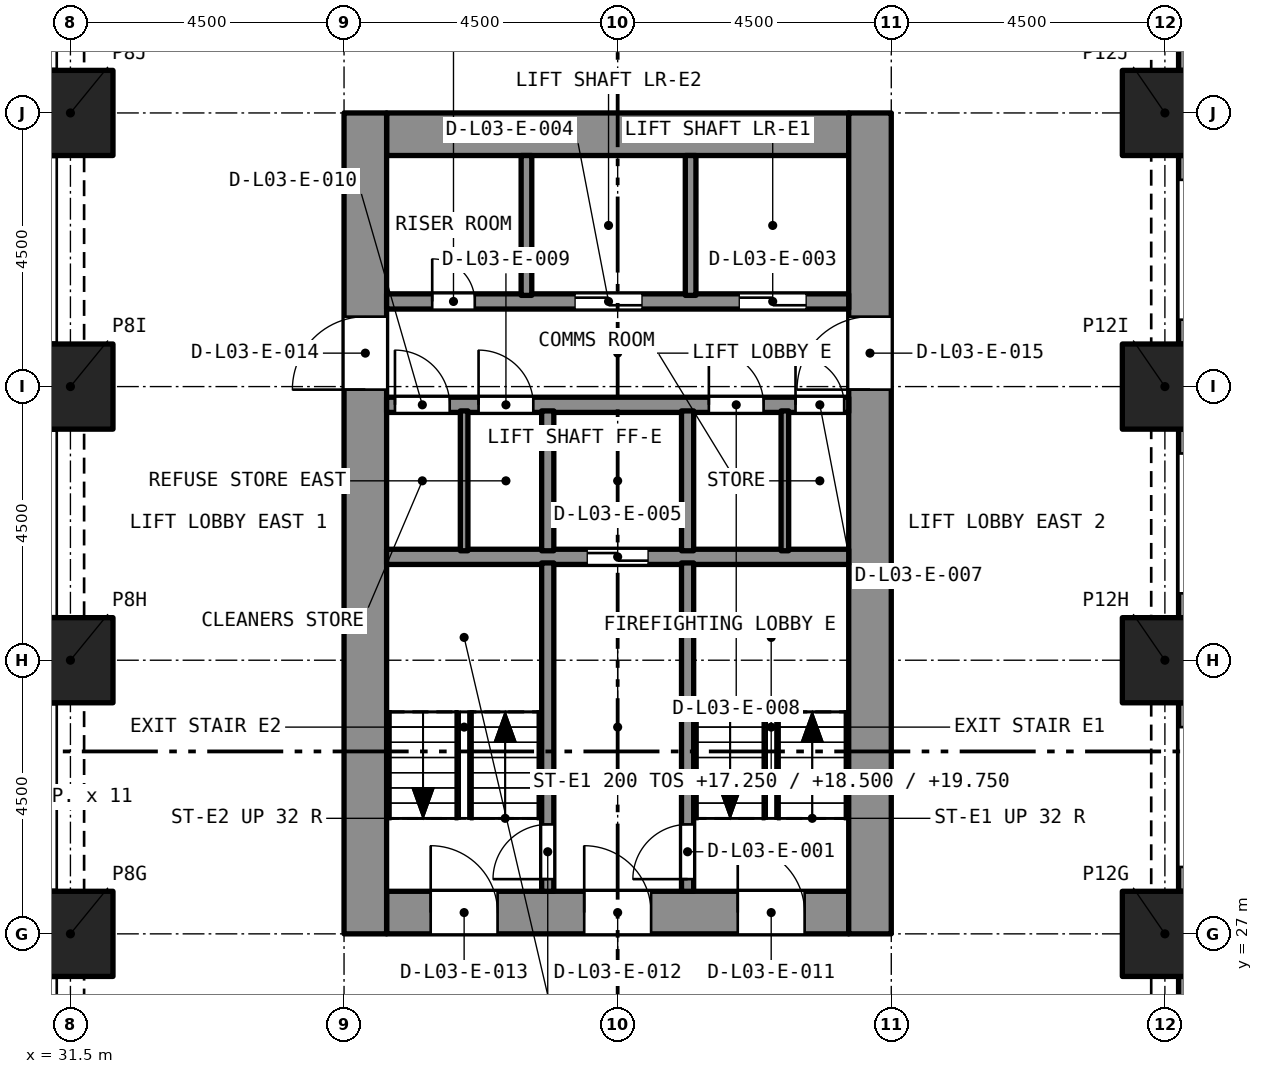
"""IFC4 building model, lengths in metres.
Left out: names, types, materials, properties, quantities, classifications, styles, units other than length and angle.
Written with IfcOpenShell. Run it as: python <this file> out.ifc"""

import sys

from ifc_helpers import new_model, si_unit, direction, frame, frame_2d, origin, origin_2d, place, context, subcontext, project, spatial, rectangle, extrude, element, fill, save


model = new_model("IFC4")
c1 = context("Model", 3, precision=1e-05, world=origin(), true_north=direction((0.0, 1.0)))
c2 = subcontext(c1, "Body", "Model", "MODEL_VIEW")
j1 = project(units=[si_unit("LENGTHUNIT", "METRE"), si_unit("PLANEANGLEUNIT", "RADIAN")], contexts=[c1])
p1 = place(None, origin())
s1 = spatial("IfcSite", under=j1, at=p1, CompositionType="ELEMENT")
p2 = place(p1, origin())
s2 = spatial("IfcBuilding", under=s1, at=p2, CompositionType="ELEMENT")
p3 = place(p2, frame((0.0, 0.0, 16.0)))
s3 = spatial("IfcBuildingStorey", under=s2, at=p3, CompositionType="ELEMENT", Elevation=16.0)
for number, where, z_axis, x_axis in (
    (1, (31.5, 27.0, 0.0), (0.0, 0.0, 1.0), (1.0, 0.0, 0.0)),
    (2, (49.5, 27.0, 0.0), (0.0, 0.0, 1.0), (1.0, 0.0, 0.0)),
    (3, (31.5, 31.5, 0.0), (0.0, 0.0, 1.0), (1.0, 0.0, 0.0)),
    (4, (49.5, 31.5, 0.0), (0.0, 0.0, 1.0), (1.0, 0.0, 0.0)),
    (5, (31.5, 36.0, 0.0), (0.0, 0.0, 1.0), (1.0, 0.0, 0.0)),
    (6, (49.5, 36.0, 0.0), (0.0, 0.0, 1.0), (1.0, 0.0, 0.0)),
    (7, (31.5, 40.5, 0.0), (0.0, 0.0, 1.0), (1.0, 0.0, 0.0)),
    (8, (49.5, 40.5, 0.0), (0.0, 0.0, 1.0), (1.0, 0.0, 0.0)),
):
    element("IfcColumn", number, at=place(p3, frame(where, z_axis=z_axis, x_axis=x_axis)), inside=s3, PredefinedType="COLUMN", context=c2, shape_type="SweptSolid", body=[
        extrude(rectangle(XDim=1.4, YDim=1.4, at=origin_2d()), origin(), (0.0, 0.0, 1.0), 5.0),
    ])
p4 = place(p3, frame((36.7, 27.35, 0.0), z_axis=(0.0, 0.0, 1.0), x_axis=(1.0, 0.0, 0.0)))
e9 = element("IfcWall", 9, at=p4, inside=s3, PredefinedType="SOLIDWALL", context=c2, shape_type="SweptSolid", body=[
    extrude(rectangle(XDim=7.6, YDim=0.7, at=frame_2d((3.8, 0.0))), origin(), (0.0, 0.0, 1.0), 5.0),
])
p5 = place(p4, frame((5.775, 0.0, 0.0)))
e10 = element("IfcOpeningElement", 10, at=p5, cuts=e9, PredefinedType="OPENING", context=c2, shape_type="SweptSolid", body=[
    extrude(rectangle(XDim=1.1, YDim=2.1, at=frame_2d((0.55, 1.05))), frame((0.0, 0.36, 0.0), z_axis=(0.0, -1.0, 0.0), x_axis=(1.0, 0.0, 0.0)), (0.0, 0.0, 1.0), 0.72),
])
p6 = place(p4, frame((3.25, 0.0, 0.0)))
e11 = element("IfcOpeningElement", 11, at=p6, cuts=e9, PredefinedType="OPENING", context=c2, shape_type="SweptSolid", body=[
    extrude(rectangle(XDim=1.1, YDim=2.1, at=frame_2d((0.55, 1.05))), frame((0.0, 0.36, 0.0), z_axis=(0.0, -1.0, 0.0), x_axis=(1.0, 0.0, 0.0)), (0.0, 0.0, 1.0), 0.72),
])
p7 = place(p4, frame((0.725, 0.0, 0.0)))
e12 = element("IfcOpeningElement", 12, at=p7, cuts=e9, PredefinedType="OPENING", context=c2, shape_type="SweptSolid", body=[
    extrude(rectangle(XDim=1.1, YDim=2.1, at=frame_2d((0.55, 1.05))), frame((0.0, 0.36, 0.0), z_axis=(0.0, -1.0, 0.0), x_axis=(1.0, 0.0, 0.0)), (0.0, 0.0, 1.0), 0.72),
])
p8 = place(p3, frame((36.7, 40.15, 0.0), z_axis=(0.0, 0.0, 1.0), x_axis=(1.0, 0.0, 0.0)))
e13 = element("IfcWall", 13, at=p8, inside=s3, PredefinedType="SOLIDWALL", context=c2, shape_type="SweptSolid", body=[
    extrude(rectangle(XDim=7.6, YDim=0.7, at=frame_2d((3.8, 0.0))), origin(), (0.0, 0.0, 1.0), 5.0),
])
p9 = place(p3, frame((36.35, 27.0, 0.0), z_axis=(0.0, 0.0, 1.0), x_axis=(0.0, 1.0, 0.0)))
e14 = element("IfcWall", 14, at=p9, inside=s3, PredefinedType="SOLIDWALL", context=c2, shape_type="SweptSolid", body=[
    extrude(rectangle(XDim=13.5, YDim=0.7, at=frame_2d((6.75, 0.0))), origin(), (0.0, 0.0, 1.0), 5.0),
])
p10 = place(p9, frame((8.95, 0.0, 0.0)))
e15 = element("IfcOpeningElement", 15, at=p10, cuts=e14, PredefinedType="OPENING", context=c2, shape_type="SweptSolid", body=[
    extrude(rectangle(XDim=1.2, YDim=2.1, at=frame_2d((0.6, 1.05))), frame((0.0, 0.36, 0.0), z_axis=(0.0, -1.0, 0.0), x_axis=(1.0, 0.0, 0.0)), (0.0, 0.0, 1.0), 0.72),
])
p11 = place(p3, frame((44.65, 27.0, 0.0), z_axis=(0.0, 0.0, 1.0), x_axis=(0.0, 1.0, 0.0)))
e16 = element("IfcWall", 16, at=p11, inside=s3, PredefinedType="SOLIDWALL", context=c2, shape_type="SweptSolid", body=[
    extrude(rectangle(XDim=13.5, YDim=0.7, at=frame_2d((6.75, 0.0))), origin(), (0.0, 0.0, 1.0), 5.0),
])
p12 = place(p11, frame((8.95, 0.0, 0.0)))
e17 = element("IfcOpeningElement", 17, at=p12, cuts=e16, PredefinedType="OPENING", context=c2, shape_type="SweptSolid", body=[
    extrude(rectangle(XDim=1.2, YDim=2.1, at=frame_2d((0.6, 1.05))), frame((0.0, 0.36, 0.0), z_axis=(0.0, -1.0, 0.0), x_axis=(1.0, 0.0, 0.0)), (0.0, 0.0, 1.0), 0.72),
])
p13 = place(p3, frame((49.875, 26.3, 0.0), z_axis=(0.0, 0.0, 1.0), x_axis=(0.0, -1.0, 0.0)))
e18 = element("IfcWall", 18, at=p13, inside=s3, PredefinedType="SOLIDWALL", context=c2, shape_type="SweptSolid", body=[
    extrude(rectangle(XDim=3.1, YDim=0.3, at=frame_2d((1.55, 0.0))), origin(), (0.0, 0.0, 1.0), 5.0),
])
p14 = place(p13, frame((0.4, 0.0, 0.45)))
e19 = element("IfcOpeningElement", 19, at=p14, cuts=e18, PredefinedType="OPENING", context=c2, shape_type="SweptSolid", body=[
    extrude(rectangle(XDim=2.3, YDim=3.3, at=frame_2d((1.15, 1.65))), frame((0.0, 0.16, 0.0), z_axis=(0.0, -1.0, 0.0), x_axis=(1.0, 0.0, 0.0)), (0.0, 0.0, 1.0), 0.32),
])
p15 = place(p3, frame((49.875, 30.8, 0.0), z_axis=(0.0, 0.0, 1.0), x_axis=(0.0, -1.0, 0.0)))
e20 = element("IfcWall", 20, at=p15, inside=s3, PredefinedType="SOLIDWALL", context=c2, shape_type="SweptSolid", body=[
    extrude(rectangle(XDim=3.1, YDim=0.3, at=frame_2d((1.55, 0.0))), origin(), (0.0, 0.0, 1.0), 5.0),
])
p16 = place(p15, frame((0.4, 0.0, 0.45)))
e21 = element("IfcOpeningElement", 21, at=p16, cuts=e20, PredefinedType="OPENING", context=c2, shape_type="SweptSolid", body=[
    extrude(rectangle(XDim=2.3, YDim=3.3, at=frame_2d((1.15, 1.65))), frame((0.0, 0.16, 0.0), z_axis=(0.0, -1.0, 0.0), x_axis=(1.0, 0.0, 0.0)), (0.0, 0.0, 1.0), 0.32),
])
p17 = place(p3, frame((49.875, 35.3, 0.0), z_axis=(0.0, 0.0, 1.0), x_axis=(0.0, -1.0, 0.0)))
e22 = element("IfcWall", 22, at=p17, inside=s3, PredefinedType="SOLIDWALL", context=c2, shape_type="SweptSolid", body=[
    extrude(rectangle(XDim=3.1, YDim=0.3, at=frame_2d((1.55, 0.0))), origin(), (0.0, 0.0, 1.0), 5.0),
])
p18 = place(p17, frame((0.4, 0.0, 0.45)))
e23 = element("IfcOpeningElement", 23, at=p18, cuts=e22, PredefinedType="OPENING", context=c2, shape_type="SweptSolid", body=[
    extrude(rectangle(XDim=2.3, YDim=3.3, at=frame_2d((1.15, 1.65))), frame((0.0, 0.16, 0.0), z_axis=(0.0, -1.0, 0.0), x_axis=(1.0, 0.0, 0.0)), (0.0, 0.0, 1.0), 0.32),
])
p19 = place(p3, frame((49.875, 39.8, 0.0), z_axis=(0.0, 0.0, 1.0), x_axis=(0.0, -1.0, 0.0)))
e24 = element("IfcWall", 24, at=p19, inside=s3, PredefinedType="SOLIDWALL", context=c2, shape_type="SweptSolid", body=[
    extrude(rectangle(XDim=3.1, YDim=0.3, at=frame_2d((1.55, 0.0))), origin(), (0.0, 0.0, 1.0), 5.0),
])
p20 = place(p19, frame((0.4, 0.0, 0.45)))
e25 = element("IfcOpeningElement", 25, at=p20, cuts=e24, PredefinedType="OPENING", context=c2, shape_type="SweptSolid", body=[
    extrude(rectangle(XDim=2.3, YDim=3.3, at=frame_2d((1.15, 1.65))), frame((0.0, 0.16, 0.0), z_axis=(0.0, -1.0, 0.0), x_axis=(1.0, 0.0, 0.0)), (0.0, 0.0, 1.0), 0.32),
])
p21 = place(p3, frame((49.875, 44.3, 0.0), z_axis=(0.0, 0.0, 1.0), x_axis=(0.0, -1.0, 0.0)))
e26 = element("IfcWall", 26, at=p21, inside=s3, PredefinedType="SOLIDWALL", context=c2, shape_type="SweptSolid", body=[
    extrude(rectangle(XDim=3.1, YDim=0.3, at=frame_2d((1.55, 0.0))), origin(), (0.0, 0.0, 1.0), 5.0),
])
p22 = place(p21, frame((0.4, 0.0, 0.45)))
e27 = element("IfcOpeningElement", 27, at=p22, cuts=e26, PredefinedType="OPENING", context=c2, shape_type="SweptSolid", body=[
    extrude(rectangle(XDim=2.3, YDim=3.3, at=frame_2d((1.15, 1.65))), frame((0.0, 0.16, 0.0), z_axis=(0.0, -1.0, 0.0), x_axis=(1.0, 0.0, 0.0)), (0.0, 0.0, 1.0), 0.32),
])
p23 = place(p3, frame((36.7, 33.2, 0.0), z_axis=(0.0, 0.0, 1.0), x_axis=(1.0, 0.0, 0.0)))
e28 = element("IfcWall", 28, at=p23, inside=s3, PredefinedType="SOLIDWALL", context=c2, shape_type="SweptSolid", body=[
    extrude(rectangle(XDim=7.6, YDim=0.25, at=frame_2d((3.8, 0.0))), origin(), (0.0, 0.0, 1.0), 4.65),
])
p24 = place(p23, frame((3.3, 0.0, 0.0)))
e29 = element("IfcOpeningElement", 29, at=p24, cuts=e28, PredefinedType="OPENING", context=c2, shape_type="SweptSolid", body=[
    extrude(rectangle(XDim=1.0, YDim=2.1, at=frame_2d((0.5, 1.05))), frame((0.0, 0.135, 0.0), z_axis=(0.0, -1.0, 0.0), x_axis=(1.0, 0.0, 0.0)), (0.0, 0.0, 1.0), 0.27),
])
p25 = place(p3, frame((36.7, 35.7, 0.0), z_axis=(0.0, 0.0, 1.0), x_axis=(1.0, 0.0, 0.0)))
e30 = element("IfcWall", 30, at=p25, inside=s3, PredefinedType="SOLIDWALL", context=c2, shape_type="SweptSolid", body=[
    extrude(rectangle(XDim=7.6, YDim=0.25, at=frame_2d((3.8, 0.0))), origin(), (0.0, 0.0, 1.0), 4.65),
])
p26 = place(p25, frame((6.725, 0.0, 0.0)))
e31 = element("IfcOpeningElement", 31, at=p26, cuts=e30, PredefinedType="OPENING", context=c2, shape_type="SweptSolid", body=[
    extrude(rectangle(XDim=0.8, YDim=2.1, at=frame_2d((0.4, 1.05))), frame((0.0, 0.135, 0.0), z_axis=(0.0, -1.0, 0.0), x_axis=(1.0, 0.0, 0.0)), (0.0, 0.0, 1.0), 0.27),
])
p27 = place(p25, frame((5.3, 0.0, 0.0)))
e32 = element("IfcOpeningElement", 32, at=p27, cuts=e30, PredefinedType="OPENING", context=c2, shape_type="SweptSolid", body=[
    extrude(rectangle(XDim=0.9, YDim=2.1, at=frame_2d((0.45, 1.05))), frame((0.0, 0.135, 0.0), z_axis=(0.0, -1.0, 0.0), x_axis=(1.0, 0.0, 0.0)), (0.0, 0.0, 1.0), 0.27),
])
p28 = place(p25, frame((1.512, 0.0, 0.0)))
e33 = element("IfcOpeningElement", 33, at=p28, cuts=e30, PredefinedType="OPENING", context=c2, shape_type="SweptSolid", body=[
    extrude(rectangle(XDim=0.9, YDim=2.1, at=frame_2d((0.45, 1.05))), frame((0.0, 0.135, 0.0), z_axis=(0.0, -1.0, 0.0), x_axis=(1.0, 0.0, 0.0)), (0.0, 0.0, 1.0), 0.27),
])
p29 = place(p25, frame((0.137, 0.0, 0.0)))
e34 = element("IfcOpeningElement", 34, at=p29, cuts=e30, PredefinedType="OPENING", context=c2, shape_type="SweptSolid", body=[
    extrude(rectangle(XDim=0.9, YDim=2.1, at=frame_2d((0.45, 1.05))), frame((0.0, 0.135, 0.0), z_axis=(0.0, -1.0, 0.0), x_axis=(1.0, 0.0, 0.0)), (0.0, 0.0, 1.0), 0.27),
])
p30 = place(p3, frame((36.7, 37.4, 0.0), z_axis=(0.0, 0.0, 1.0), x_axis=(1.0, 0.0, 0.0)))
e35 = element("IfcWall", 35, at=p30, inside=s3, PredefinedType="SOLIDWALL", context=c2, shape_type="SweptSolid", body=[
    extrude(rectangle(XDim=7.6, YDim=0.25, at=frame_2d((3.8, 0.0))), origin(), (0.0, 0.0, 1.0), 4.65),
])
p31 = place(p30, frame((5.8, 0.0, 0.0)))
e36 = element("IfcOpeningElement", 36, at=p31, cuts=e35, PredefinedType="OPENING", context=c2, shape_type="SweptSolid", body=[
    extrude(rectangle(XDim=1.1, YDim=2.4, at=frame_2d((0.55, 1.2))), frame((0.0, 0.135, 0.0), z_axis=(0.0, -1.0, 0.0), x_axis=(1.0, 0.0, 0.0)), (0.0, 0.0, 1.0), 0.27),
])
p32 = place(p30, frame((3.1, 0.0, 0.0)))
e37 = element("IfcOpeningElement", 37, at=p32, cuts=e35, PredefinedType="OPENING", context=c2, shape_type="SweptSolid", body=[
    extrude(rectangle(XDim=1.1, YDim=2.4, at=frame_2d((0.55, 1.2))), frame((0.0, 0.135, 0.0), z_axis=(0.0, -1.0, 0.0), x_axis=(1.0, 0.0, 0.0)), (0.0, 0.0, 1.0), 0.27),
])
p33 = place(p30, frame((0.75, 0.0, 0.0)))
e38 = element("IfcOpeningElement", 38, at=p33, cuts=e35, PredefinedType="OPENING", context=c2, shape_type="SweptSolid", body=[
    extrude(rectangle(XDim=0.7, YDim=2.1, at=frame_2d((0.35, 1.05))), frame((0.0, 0.135, 0.0), z_axis=(0.0, -1.0, 0.0), x_axis=(1.0, 0.0, 0.0)), (0.0, 0.0, 1.0), 0.27),
])
p34 = place(p3, frame((41.65, 27.7, 0.0), z_axis=(0.0, 0.0, 1.0), x_axis=(0.0, 1.0, 0.0)))
e39 = element("IfcWall", 39, at=p34, inside=s3, PredefinedType="SOLIDWALL", context=c2, shape_type="SweptSolid", body=[
    extrude(rectangle(XDim=5.4, YDim=0.2, at=frame_2d((2.7, 0.0))), origin(), (0.0, 0.0, 1.0), 4.65),
])
p35 = place(p34, frame((0.2, 0.0, 0.0)))
e40 = element("IfcOpeningElement", 40, at=p35, cuts=e39, PredefinedType="OPENING", context=c2, shape_type="SweptSolid", body=[
    extrude(rectangle(XDim=0.9, YDim=2.1, at=frame_2d((0.45, 1.05))), frame((0.0, 0.11, 0.0), z_axis=(0.0, -1.0, 0.0), x_axis=(1.0, 0.0, 0.0)), (0.0, 0.0, 1.0), 0.22),
])
p36 = place(p3, frame((39.35, 27.7, 0.0), z_axis=(0.0, 0.0, 1.0), x_axis=(0.0, 1.0, 0.0)))
e41 = element("IfcWall", 41, at=p36, inside=s3, PredefinedType="SOLIDWALL", context=c2, shape_type="SweptSolid", body=[
    extrude(rectangle(XDim=5.4, YDim=0.2, at=frame_2d((2.7, 0.0))), origin(), (0.0, 0.0, 1.0), 4.65),
])
p37 = place(p36, frame((0.2, 0.0, 0.0)))
e42 = element("IfcOpeningElement", 42, at=p37, cuts=e41, PredefinedType="OPENING", context=c2, shape_type="SweptSolid", body=[
    extrude(rectangle(XDim=0.9, YDim=2.1, at=frame_2d((0.45, 1.05))), frame((0.0, 0.11, 0.0), z_axis=(0.0, -1.0, 0.0), x_axis=(1.0, 0.0, 0.0)), (0.0, 0.0, 1.0), 0.22),
])
for number, where, z_axis, x_axis in (
    (43, (41.65, 33.3, 0.0), (0.0, 0.0, 1.0), (0.0, 1.0, 0.0)),
    (44, (39.35, 33.3, 0.0), (0.0, 0.0, 1.0), (0.0, 1.0, 0.0)),
):
    element("IfcWall", number, at=place(p3, frame(where, z_axis=z_axis, x_axis=x_axis)), inside=s3, PredefinedType="SOLIDWALL", context=c2, shape_type="SweptSolid", body=[
        extrude(rectangle(XDim=2.3, YDim=0.2, at=frame_2d((1.15, 0.0))), origin(), (0.0, 0.0, 1.0), 4.65),
    ])
for number, where, z_axis, x_axis in (
    (45, (41.7, 37.5, 0.0), (0.0, 0.0, 1.0), (0.0, 1.0, 0.0)),
    (46, (39.0, 37.5, 0.0), (0.0, 0.0, 1.0), (0.0, 1.0, 0.0)),
):
    element("IfcWall", number, at=place(p3, frame(where, z_axis=z_axis, x_axis=x_axis)), inside=s3, PredefinedType="SOLIDWALL", context=c2, shape_type="SweptSolid", body=[
        extrude(rectangle(XDim=2.3, YDim=0.175, at=frame_2d((1.15, 0.0))), origin(), (0.0, 0.0, 1.0), 4.65),
    ])
for number, where, z_axis, x_axis in (
    (47, (43.25, 33.3, 0.0), (0.0, 0.0, 1.0), (0.0, 1.0, 0.0)),
    (48, (37.975, 33.3, 0.0), (0.0, 0.0, 1.0), (0.0, 1.0, 0.0)),
):
    element("IfcWall", number, at=place(p3, frame(where, z_axis=z_axis, x_axis=x_axis)), inside=s3, PredefinedType="PARTITIONING", context=c2, shape_type="SweptSolid", body=[
        extrude(rectangle(XDim=2.3, YDim=0.125, at=frame_2d((1.15, 0.0))), origin(), (0.0, 0.0, 1.0), 4.65),
    ])
p38 = place(p35, origin())
e49 = element("IfcDoor", 49, at=p38, inside=s3, OperationType="SINGLE_SWING_LEFT", PredefinedType="DOOR", context=c2, shape_type="SweptSolid", body=[
    extrude(rectangle(XDim=0.9, YDim=2.1, at=frame_2d((0.45, 1.05))), frame((0.0, 0.025, 0.0), z_axis=(0.0, -1.0, 0.0), x_axis=(1.0, 0.0, 0.0)), (0.0, 0.0, 1.0), 0.05),
])
fill(e40, e49)
p39 = place(p37, origin())
e50 = element("IfcDoor", 50, at=p39, inside=s3, OperationType="SINGLE_SWING_LEFT", PredefinedType="DOOR", context=c2, shape_type="SweptSolid", body=[
    extrude(rectangle(XDim=0.9, YDim=2.1, at=frame_2d((0.45, 1.05))), frame((0.0, 0.025, 0.0), z_axis=(0.0, -1.0, 0.0), x_axis=(1.0, 0.0, 0.0)), (0.0, 0.0, 1.0), 0.05),
])
fill(e42, e50)
p40 = place(p31, origin())
e51 = element("IfcDoor", 51, at=p40, inside=s3, OperationType="SLIDING_TO_LEFT", PredefinedType="DOOR", context=c2, shape_type="SweptSolid", body=[
    extrude(rectangle(XDim=1.1, YDim=2.4, at=frame_2d((0.55, 1.2))), frame((0.0, 0.025, 0.0), z_axis=(0.0, -1.0, 0.0), x_axis=(1.0, 0.0, 0.0)), (0.0, 0.0, 1.0), 0.05),
])
fill(e36, e51)
p41 = place(p32, origin())
e52 = element("IfcDoor", 52, at=p41, inside=s3, OperationType="SLIDING_TO_LEFT", PredefinedType="DOOR", context=c2, shape_type="SweptSolid", body=[
    extrude(rectangle(XDim=1.1, YDim=2.4, at=frame_2d((0.55, 1.2))), frame((0.0, 0.025, 0.0), z_axis=(0.0, -1.0, 0.0), x_axis=(1.0, 0.0, 0.0)), (0.0, 0.0, 1.0), 0.05),
])
fill(e37, e52)
p42 = place(p24, origin())
e53 = element("IfcDoor", 53, at=p42, inside=s3, OperationType="SLIDING_TO_LEFT", PredefinedType="DOOR", context=c2, shape_type="SweptSolid", body=[
    extrude(rectangle(XDim=1.0, YDim=2.1, at=frame_2d((0.5, 1.05))), frame((0.0, 0.025, 0.0), z_axis=(0.0, -1.0, 0.0), x_axis=(1.0, 0.0, 0.0)), (0.0, 0.0, 1.0), 0.05),
])
fill(e29, e53)
p43 = place(p33, origin())
e54 = element("IfcDoor", 54, at=p43, inside=s3, OperationType="SINGLE_SWING_LEFT", PredefinedType="DOOR", context=c2, shape_type="SweptSolid", body=[
    extrude(rectangle(XDim=0.7, YDim=2.1, at=frame_2d((0.35, 1.05))), frame((0.0, 0.025, 0.0), z_axis=(0.0, -1.0, 0.0), x_axis=(1.0, 0.0, 0.0)), (0.0, 0.0, 1.0), 0.05),
])
fill(e38, e54)
p44 = place(p26, origin())
e55 = element("IfcDoor", 55, at=p44, inside=s3, OperationType="SINGLE_SWING_LEFT", PredefinedType="DOOR", context=c2, shape_type="SweptSolid", body=[
    extrude(rectangle(XDim=0.8, YDim=2.1, at=frame_2d((0.4, 1.05))), frame((0.0, 0.025, 0.0), z_axis=(0.0, -1.0, 0.0), x_axis=(1.0, 0.0, 0.0)), (0.0, 0.0, 1.0), 0.05),
])
fill(e31, e55)
p45 = place(p27, origin())
e56 = element("IfcDoor", 56, at=p45, inside=s3, OperationType="SINGLE_SWING_LEFT", PredefinedType="DOOR", context=c2, shape_type="SweptSolid", body=[
    extrude(rectangle(XDim=0.9, YDim=2.1, at=frame_2d((0.45, 1.05))), frame((0.0, 0.025, 0.0), z_axis=(0.0, -1.0, 0.0), x_axis=(1.0, 0.0, 0.0)), (0.0, 0.0, 1.0), 0.05),
])
fill(e32, e56)
p46 = place(p28, origin())
e57 = element("IfcDoor", 57, at=p46, inside=s3, OperationType="SINGLE_SWING_LEFT", PredefinedType="DOOR", context=c2, shape_type="SweptSolid", body=[
    extrude(rectangle(XDim=0.9, YDim=2.1, at=frame_2d((0.45, 1.05))), frame((0.0, 0.025, 0.0), z_axis=(0.0, -1.0, 0.0), x_axis=(1.0, 0.0, 0.0)), (0.0, 0.0, 1.0), 0.05),
])
fill(e33, e57)
p47 = place(p29, origin())
e58 = element("IfcDoor", 58, at=p47, inside=s3, OperationType="SINGLE_SWING_LEFT", PredefinedType="DOOR", context=c2, shape_type="SweptSolid", body=[
    extrude(rectangle(XDim=0.9, YDim=2.1, at=frame_2d((0.45, 1.05))), frame((0.0, 0.025, 0.0), z_axis=(0.0, -1.0, 0.0), x_axis=(1.0, 0.0, 0.0)), (0.0, 0.0, 1.0), 0.05),
])
fill(e34, e58)
p48 = place(p5, origin())
e59 = element("IfcDoor", 59, at=p48, inside=s3, OperationType="SINGLE_SWING_LEFT", PredefinedType="DOOR", context=c2, shape_type="SweptSolid", body=[
    extrude(rectangle(XDim=1.1, YDim=2.1, at=frame_2d((0.55, 1.05))), frame((0.0, 0.025, 0.0), z_axis=(0.0, -1.0, 0.0), x_axis=(1.0, 0.0, 0.0)), (0.0, 0.0, 1.0), 0.05),
])
fill(e10, e59)
p49 = place(p6, origin())
e60 = element("IfcDoor", 60, at=p49, inside=s3, OperationType="SINGLE_SWING_LEFT", PredefinedType="DOOR", context=c2, shape_type="SweptSolid", body=[
    extrude(rectangle(XDim=1.1, YDim=2.1, at=frame_2d((0.55, 1.05))), frame((0.0, 0.025, 0.0), z_axis=(0.0, -1.0, 0.0), x_axis=(1.0, 0.0, 0.0)), (0.0, 0.0, 1.0), 0.05),
])
fill(e11, e60)
p50 = place(p7, origin())
e61 = element("IfcDoor", 61, at=p50, inside=s3, OperationType="SINGLE_SWING_LEFT", PredefinedType="DOOR", context=c2, shape_type="SweptSolid", body=[
    extrude(rectangle(XDim=1.1, YDim=2.1, at=frame_2d((0.55, 1.05))), frame((0.0, 0.025, 0.0), z_axis=(0.0, -1.0, 0.0), x_axis=(1.0, 0.0, 0.0)), (0.0, 0.0, 1.0), 0.05),
])
fill(e12, e61)
p51 = place(p10, origin())
e62 = element("IfcDoor", 62, at=p51, inside=s3, OperationType="SINGLE_SWING_LEFT", PredefinedType="DOOR", context=c2, shape_type="SweptSolid", body=[
    extrude(rectangle(XDim=1.2, YDim=2.1, at=frame_2d((0.6, 1.05))), frame((0.0, 0.025, 0.0), z_axis=(0.0, -1.0, 0.0), x_axis=(1.0, 0.0, 0.0)), (0.0, 0.0, 1.0), 0.05),
])
fill(e15, e62)
p52 = place(p12, origin())
e63 = element("IfcDoor", 63, at=p52, inside=s3, OperationType="SINGLE_SWING_LEFT", PredefinedType="DOOR", context=c2, shape_type="SweptSolid", body=[
    extrude(rectangle(XDim=1.2, YDim=2.1, at=frame_2d((0.6, 1.05))), frame((0.0, 0.025, 0.0), z_axis=(0.0, -1.0, 0.0), x_axis=(1.0, 0.0, 0.0)), (0.0, 0.0, 1.0), 0.05),
])
fill(e17, e63)
save(model, sys.argv[1])
